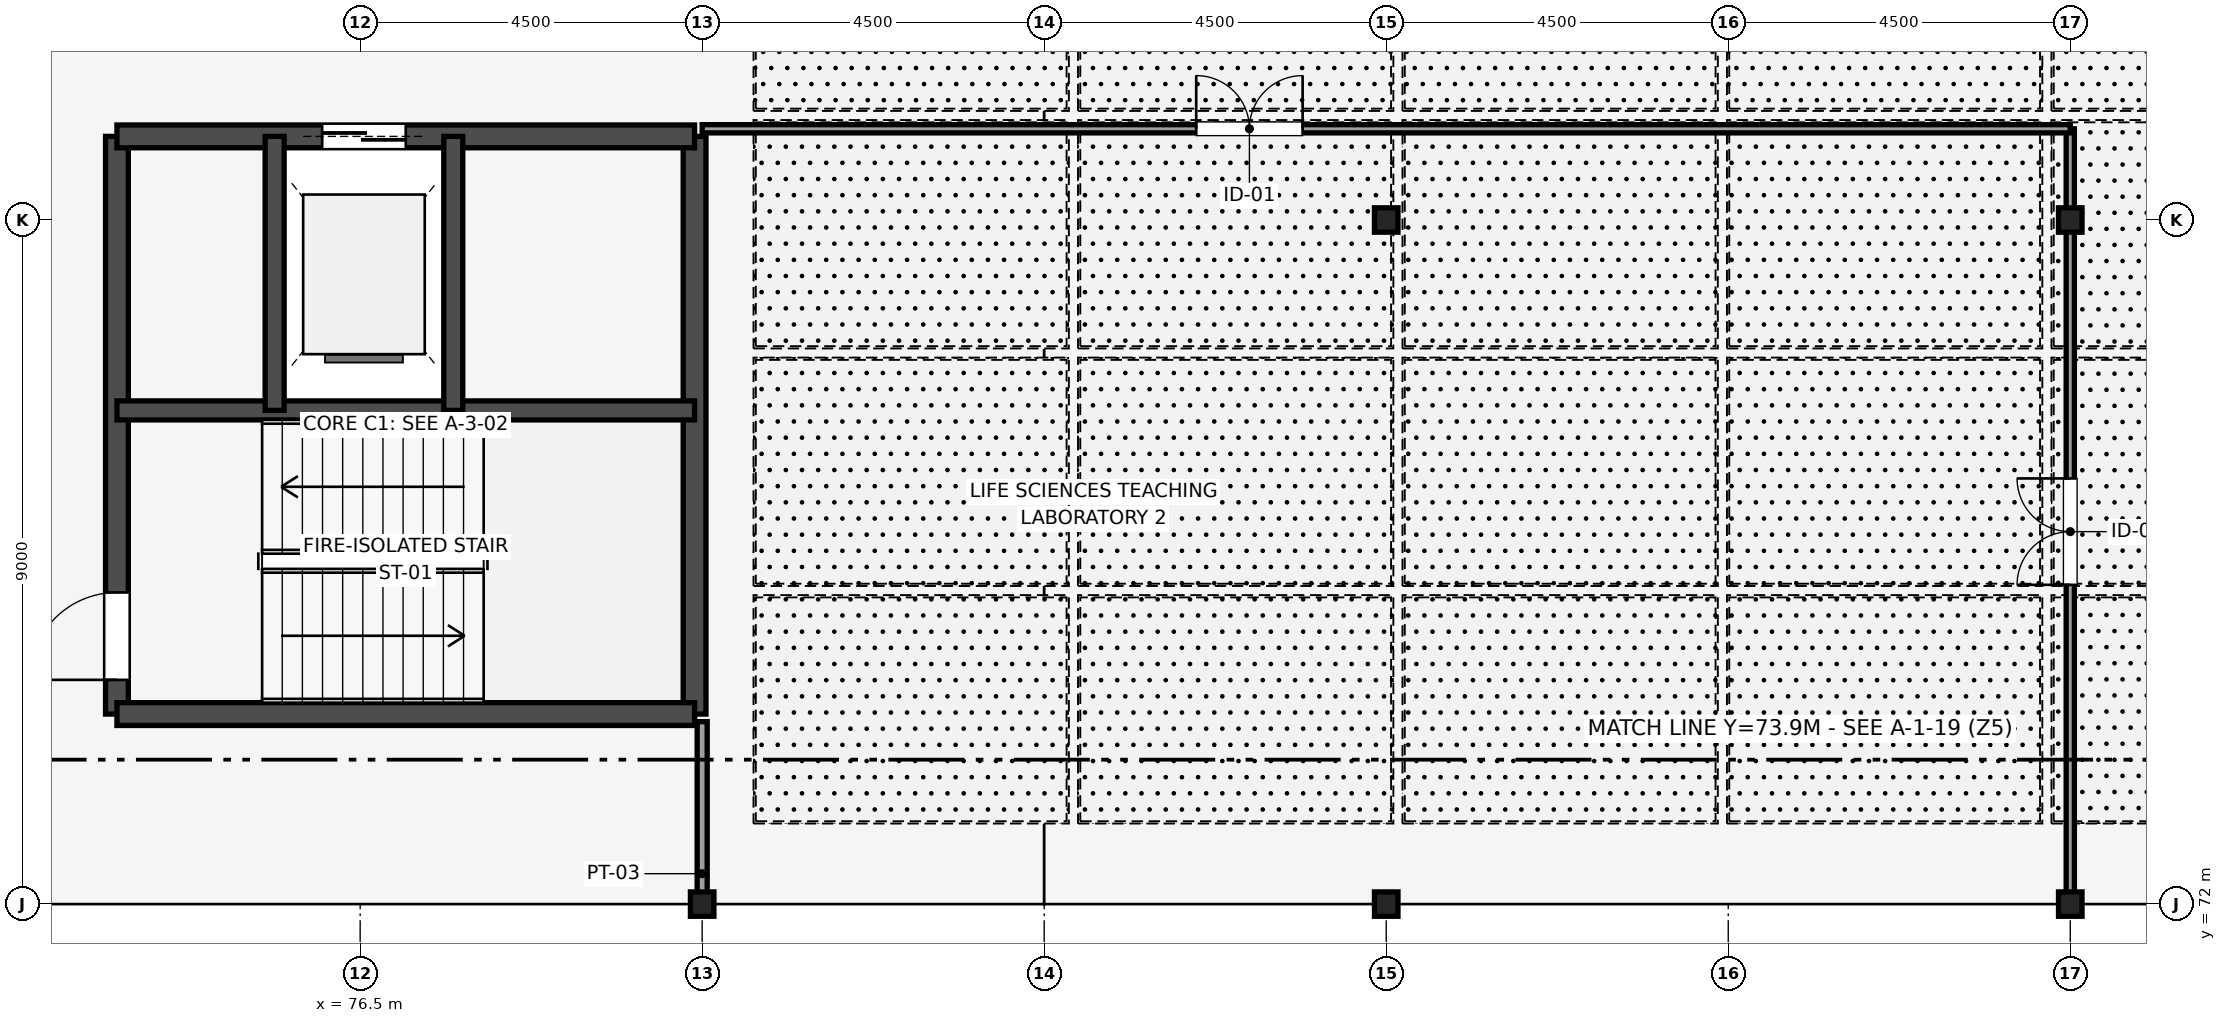
"""IFC4 building model, lengths in metres.
Left out: names, types, materials, properties, quantities, classifications, styles, units other than length and angle.
Written with IfcOpenShell. Run it as: python <this file> out.ifc"""

import sys

from ifc_helpers import new_model, si_unit, direction, frame, frame_2d, origin, origin_2d, place, context, subcontext, project, spatial, rectangle, i_section, extrude, element, fill, save


model = new_model("IFC4")
c1 = context("Model", 3, precision=1e-05, world=origin(), true_north=direction((0.0, 1.0)))
c2 = subcontext(c1, "Body", "Model", "MODEL_VIEW")
j1 = project(units=[si_unit("LENGTHUNIT", "METRE"), si_unit("PLANEANGLEUNIT", "RADIAN")], contexts=[c1])
p1 = place(None, origin())
s1 = spatial("IfcSite", under=j1, at=p1, CompositionType="ELEMENT")
p2 = place(p1, origin())
s2 = spatial("IfcBuilding", under=s1, at=p2, CompositionType="ELEMENT")
p3 = place(p2, frame((0.0, 0.0, 5.4)))
s3 = spatial("IfcBuildingStorey", under=s2, at=p3, CompositionType="ELEMENT", Elevation=5.4)
for number, where, z_axis, x_axis in (
    (1, (81.0, 72.0, 0.0), (0.0, 0.0, 1.0), (1.0, 0.0, 0.0)),
    (2, (90.0, 72.0, 0.0), (0.0, 0.0, 1.0), (1.0, 0.0, 0.0)),
    (3, (90.0, 81.0, 0.0), (0.0, 0.0, 1.0), (1.0, 0.0, 0.0)),
    (4, (99.0, 72.0, 0.0), (0.0, 0.0, 1.0), (1.0, 0.0, 0.0)),
    (5, (99.0, 81.0, 0.0), (0.0, 0.0, 1.0), (1.0, 0.0, 0.0)),
):
    element("IfcColumn", number, at=place(p3, frame(where, z_axis=z_axis, x_axis=x_axis)), inside=s3, PredefinedType="COLUMN", context=c2, shape_type="SweptSolid", body=[
        extrude(i_section(OverallWidth=0.309, OverallDepth=0.321, WebThickness=0.014, FlangeThickness=0.022, FilletRadius=0.017, at=origin_2d()), origin(), (0.0, 0.0, 1.0), 4.5),
    ])
p4 = place(p3, frame((73.3, 74.5, 0.0), z_axis=(0.0, 0.0, 1.0), x_axis=(0.0, 1.0, 0.0)))
e6 = element("IfcWall", 6, at=p4, inside=s3, PredefinedType="SHEAR", context=c2, shape_type="SweptSolid", body=[
    extrude(rectangle(XDim=7.6, YDim=0.3, at=frame_2d((3.8, 0.0))), origin(), (0.0, 0.0, 1.0), 4.5),
])
p5 = place(p4, frame((0.45, 0.0, 0.0)))
e7 = element("IfcOpeningElement", 7, at=p5, cuts=e6, PredefinedType="OPENING", context=c2, shape_type="SweptSolid", body=[
    extrude(rectangle(XDim=1.15, YDim=2.15, at=frame_2d((0.575, 1.075))), frame((0.0, 0.16, 0.0), z_axis=(0.0, -1.0, 0.0), x_axis=(1.0, 0.0, 0.0)), (0.0, 0.0, 1.0), 0.32),
])
p6 = place(p3, frame((80.9, 74.5, 0.0), z_axis=(0.0, 0.0, 1.0), x_axis=(0.0, 1.0, 0.0)))
e8 = element("IfcWall", 8, at=p6, inside=s3, PredefinedType="SHEAR", context=c2, shape_type="SweptSolid", body=[
    extrude(rectangle(XDim=7.6, YDim=0.3, at=frame_2d((3.8, 0.0))), origin(), (0.0, 0.0, 1.0), 4.5),
])
p7 = place(p3, frame((73.3, 74.5, 0.0), z_axis=(0.0, 0.0, 1.0), x_axis=(1.0, 0.0, 0.0)))
e9 = element("IfcWall", 9, at=p7, inside=s3, PredefinedType="SHEAR", context=c2, shape_type="SweptSolid", body=[
    extrude(rectangle(XDim=7.6, YDim=0.3, at=frame_2d((3.8, 0.0))), origin(), (0.0, 0.0, 1.0), 4.5),
])
p8 = place(p3, frame((73.3, 82.1, 0.0), z_axis=(0.0, 0.0, 1.0), x_axis=(1.0, 0.0, 0.0)))
e10 = element("IfcWall", 10, at=p8, inside=s3, PredefinedType="SHEAR", context=c2, shape_type="SweptSolid", body=[
    extrude(rectangle(XDim=7.6, YDim=0.3, at=frame_2d((3.8, 0.0))), origin(), (0.0, 0.0, 1.0), 4.5),
])
p9 = place(p8, frame((2.7, 0.0, 0.0)))
e11 = element("IfcOpeningElement", 11, at=p9, cuts=e10, PredefinedType="OPENING", context=c2, shape_type="SweptSolid", body=[
    extrude(rectangle(XDim=1.1, YDim=2.2, at=frame_2d((0.55, 1.1))), frame((0.0, 0.16, 0.0), z_axis=(0.0, -1.0, 0.0), x_axis=(1.0, 0.0, 0.0)), (0.0, 0.0, 1.0), 0.32),
])
p10 = place(p3, frame((73.3, 78.495, 0.0), z_axis=(0.0, 0.0, 1.0), x_axis=(1.0, 0.0, 0.0)))
e12 = element("IfcWall", 12, at=p10, inside=s3, PredefinedType="SHEAR", context=c2, shape_type="SweptSolid", body=[
    extrude(rectangle(XDim=7.6, YDim=0.25, at=frame_2d((3.8, 0.0))), origin(), (0.0, 0.0, 1.0), 4.5),
])
for number, where, z_axis, x_axis in (
    (13, (75.375, 78.495, 0.0), (0.0, 0.0, 1.0), (0.0, 1.0, 0.0)),
    (14, (77.725, 78.495, 0.0), (0.0, 0.0, 1.0), (0.0, 1.0, 0.0)),
):
    element("IfcWall", number, at=place(p3, frame(where, z_axis=z_axis, x_axis=x_axis)), inside=s3, PredefinedType="SHEAR", context=c2, shape_type="SweptSolid", body=[
        extrude(rectangle(XDim=3.605, YDim=0.25, at=frame_2d((1.802, 0.0))), origin(), (0.0, 0.0, 1.0), 4.5),
    ])
p11 = place(p3, frame((99.0, 72.0, 0.0), z_axis=(0.0, 0.0, 1.0), x_axis=(1.0, 0.0, 0.0)))
e15 = element("IfcWall", 15, at=p11, inside=s3, PredefinedType="STANDARD", context=c2, shape_type="SweptSolid", body=[
    extrude(rectangle(XDim=9.0, YDim=0.25, at=frame_2d((4.5, 0.0))), origin(), (0.0, 0.0, 1.0), 3.846),
])
p12 = place(p11, frame((3.5, 0.0, 0.0)))
e16 = element("IfcOpeningElement", 16, at=p12, cuts=e15, PredefinedType="OPENING", context=c2, shape_type="SweptSolid", body=[
    extrude(rectangle(XDim=2.0, YDim=2.5, at=frame_2d((1.0, 1.25))), frame((0.0, 0.135, 0.0), z_axis=(0.0, -1.0, 0.0), x_axis=(1.0, 0.0, 0.0)), (0.0, 0.0, 1.0), 0.27),
])
p13 = place(p3, frame((81.0, 72.0, 0.0), z_axis=(0.0, 0.0, 1.0), x_axis=(0.0, 1.0, 0.0)))
e17 = element("IfcWall", 17, at=p13, inside=s3, PredefinedType="PARTITIONING", context=c2, shape_type="SweptSolid", body=[
    extrude(rectangle(XDim=2.4, YDim=0.132, at=frame_2d((1.2, 0.0))), origin(), (0.0, 0.0, 1.0), 3.6),
])
p14 = place(p3, frame((99.0, 72.0, 0.0), z_axis=(0.0, 0.0, 1.0), x_axis=(0.0, 1.0, 0.0)))
e18 = element("IfcWall", 18, at=p14, inside=s3, PredefinedType="PARTITIONING", context=c2, shape_type="SweptSolid", body=[
    extrude(rectangle(XDim=10.2, YDim=0.108, at=frame_2d((5.1, 0.0))), origin(), (0.0, 0.0, 1.0), 3.772),
])
p15 = place(p14, frame((4.2, 0.0, 0.0)))
e19 = element("IfcOpeningElement", 19, at=p15, cuts=e18, PredefinedType="OPENING", context=c2, shape_type="SweptSolid", body=[
    extrude(rectangle(XDim=1.4, YDim=2.2, at=frame_2d((0.7, 1.1))), frame((0.0, 0.064, 0.0), z_axis=(0.0, -1.0, 0.0), x_axis=(1.0, 0.0, 0.0)), (0.0, 0.0, 1.0), 0.128),
])
p16 = place(p3, frame((81.0, 82.2, 0.0), z_axis=(0.0, 0.0, 1.0), x_axis=(1.0, 0.0, 0.0)))
e20 = element("IfcWall", 20, at=p16, inside=s3, PredefinedType="PARTITIONING", context=c2, shape_type="SweptSolid", body=[
    extrude(rectangle(XDim=18.0, YDim=0.108, at=frame_2d((9.0, 0.0))), origin(), (0.0, 0.0, 1.0), 4.32),
])
p17 = place(p16, frame((6.5, 0.0, 0.0)))
e21 = element("IfcOpeningElement", 21, at=p17, cuts=e20, PredefinedType="OPENING", context=c2, shape_type="SweptSolid", body=[
    extrude(rectangle(XDim=1.4, YDim=2.2, at=frame_2d((0.7, 1.1))), frame((0.0, 0.064, 0.0), z_axis=(0.0, -1.0, 0.0), x_axis=(1.0, 0.0, 0.0)), (0.0, 0.0, 1.0), 0.128),
])
p18 = place(p5, origin())
e22 = element("IfcDoor", 22, at=p18, inside=s3, OperationType="SINGLE_SWING_LEFT", PredefinedType="DOOR", context=c2, shape_type="SweptSolid", body=[
    extrude(rectangle(XDim=1.15, YDim=2.15, at=frame_2d((0.575, 1.075))), frame((0.0, 0.025, 0.0), z_axis=(0.0, -1.0, 0.0), x_axis=(1.0, 0.0, 0.0)), (0.0, 0.0, 1.0), 0.05),
])
fill(e7, e22)
p19 = place(p9, origin())
e23 = element("IfcDoor", 23, at=p19, inside=s3, OperationType="DOUBLE_DOOR_SLIDING", PredefinedType="DOOR", context=c2, shape_type="SweptSolid", body=[
    extrude(rectangle(XDim=1.1, YDim=2.2, at=frame_2d((0.55, 1.1))), frame((0.0, 0.025, 0.0), z_axis=(0.0, -1.0, 0.0), x_axis=(1.0, 0.0, 0.0)), (0.0, 0.0, 1.0), 0.05),
])
fill(e11, e23)
p20 = place(p15, origin())
e24 = element("IfcDoor", 24, at=p20, inside=s3, OperationType="DOUBLE_DOOR_SINGLE_SWING", PredefinedType="DOOR", context=c2, shape_type="SweptSolid", body=[
    extrude(rectangle(XDim=1.4, YDim=2.2, at=frame_2d((0.7, 1.1))), frame((0.0, 0.025, 0.0), z_axis=(0.0, -1.0, 0.0), x_axis=(1.0, 0.0, 0.0)), (0.0, 0.0, 1.0), 0.05),
])
fill(e19, e24)
p21 = place(p17, origin())
e25 = element("IfcDoor", 25, at=p21, inside=s3, OperationType="DOUBLE_DOOR_SINGLE_SWING", PredefinedType="DOOR", context=c2, shape_type="SweptSolid", body=[
    extrude(rectangle(XDim=1.4, YDim=2.2, at=frame_2d((0.7, 1.1))), frame((0.0, 0.025, 0.0), z_axis=(0.0, -1.0, 0.0), x_axis=(1.0, 0.0, 0.0)), (0.0, 0.0, 1.0), 0.05),
])
fill(e21, e25)
save(model, sys.argv[1])
